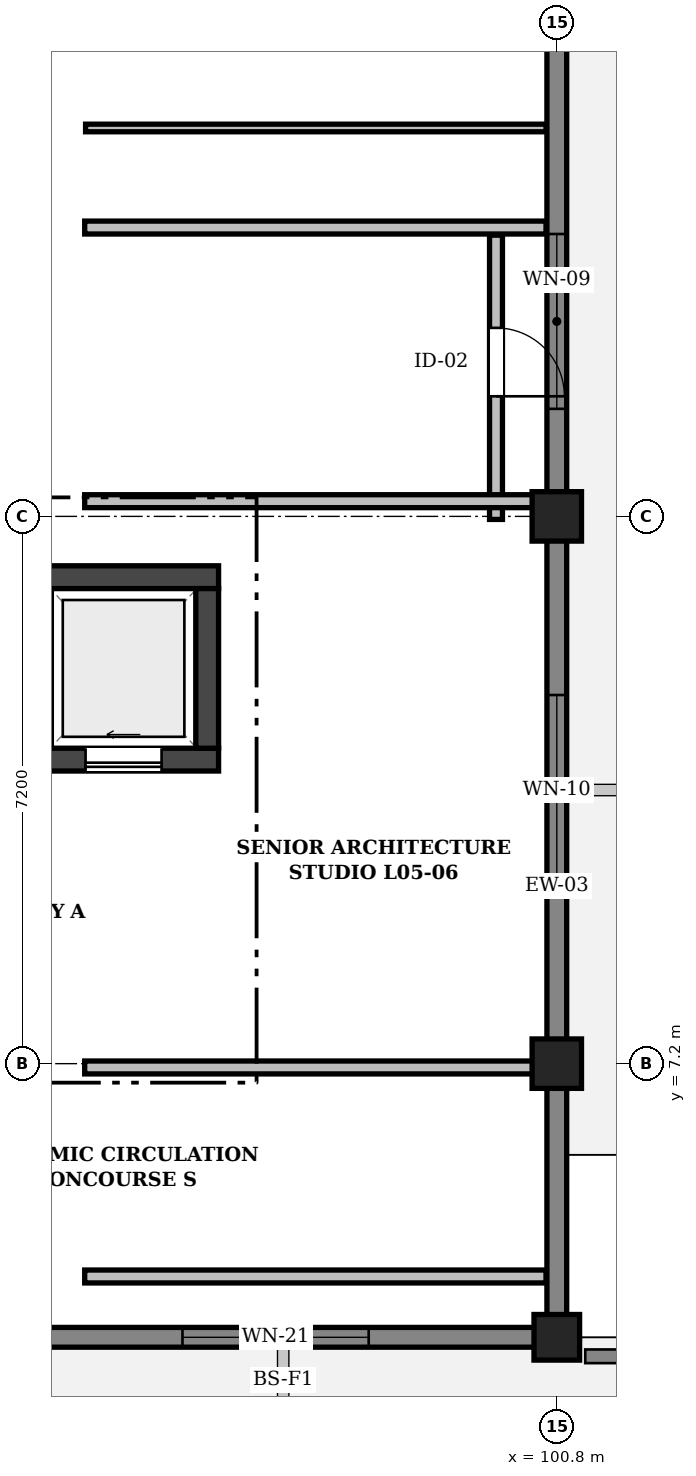
"""IFC4 building model, lengths in metres.
Left out: names, types, materials, properties, quantities, classifications, styles, units other than length and angle.
Written with IfcOpenShell. Run it as: python <this file> out.ifc"""

import sys

from ifc_helpers import new_model, si_unit, direction, frame, frame_2d, origin, origin_2d, place, context, subcontext, project, spatial, rectangle, extrude, element, fill, save


model = new_model("IFC4")
c1 = context("Model", 3, precision=1e-05, world=origin(), true_north=direction((0.0, 1.0)))
c2 = subcontext(c1, "Body", "Model", "MODEL_VIEW")
j1 = project(units=[si_unit("LENGTHUNIT", "METRE"), si_unit("PLANEANGLEUNIT", "RADIAN")], contexts=[c1])
p1 = place(None, origin())
s1 = spatial("IfcSite", under=j1, at=p1, CompositionType="ELEMENT")
p2 = place(p1, origin())
s2 = spatial("IfcBuilding", under=s1, at=p2, CompositionType="ELEMENT")
p3 = place(p2, frame((0.0, 0.0, 23.4)))
s3 = spatial("IfcBuildingStorey", under=s2, at=p3, CompositionType="ELEMENT", Elevation=23.4)
p4 = place(p3, frame((100.8, 3.6, 0.0), z_axis=(0.0, 0.0, 1.0), x_axis=(1.0, 0.0, 0.0)))
e1 = element("IfcColumn", 1, at=p4, inside=s3, PredefinedType="COLUMN", context=c2, shape_type="SweptSolid", body=[
    extrude(rectangle(XDim=0.6, YDim=0.6, at=origin_2d()), origin(), (0.0, 0.0, 1.0), 4.5),
])
for number, where, z_axis, x_axis in (
    (2, (100.8, 7.2, 0.0), (0.0, 0.0, 1.0), (1.0, 0.0, 0.0)),
    (3, (100.8, 14.4, 0.0), (0.0, 0.0, 1.0), (1.0, 0.0, 0.0)),
):
    element("IfcColumn", number, at=place(p3, frame(where, z_axis=z_axis, x_axis=x_axis)), inside=s3, PredefinedType="COLUMN", context=c2, shape_type="SweptSolid", body=[
        extrude(rectangle(XDim=0.65, YDim=0.65, at=origin_2d()), origin(), (0.0, 0.0, 1.0), 4.5),
    ])
p5 = place(p3, frame((100.95, 3.6, 0.0), z_axis=(0.0, 0.0, 1.0), x_axis=(-1.0, 0.0, 0.0)))
e4 = element("IfcWall", 4, at=p5, inside=s3, PredefinedType="SOLIDWALL", context=c2, shape_type="SweptSolid", body=[
    extrude(rectangle(XDim=7.35, YDim=0.26, at=frame_2d((3.675, 0.0))), origin(), (0.0, 0.0, 1.0), 4.22),
])
p6 = place(p5, frame((2.625, 0.0, 0.95)))
e5 = element("IfcOpeningElement", 5, at=p6, cuts=e4, PredefinedType="OPENING", context=c2, shape_type="SweptSolid", body=[
    extrude(rectangle(XDim=2.45, YDim=1.55, at=frame_2d((1.225, 0.775))), frame((0.0, 0.142, 0.0), z_axis=(0.0, -1.0, 0.0), x_axis=(1.0, 0.0, 0.0)), (0.0, 0.0, 1.0), 0.284),
])
p7 = place(p3, frame((100.8, 21.6, 0.0), z_axis=(0.0, 0.0, 1.0), x_axis=(0.0, -1.0, 0.0)))
e6 = element("IfcWall", 6, at=p7, inside=s3, PredefinedType="SOLIDWALL", context=c2, shape_type="SweptSolid", body=[
    extrude(rectangle(XDim=7.2, YDim=0.26, at=frame_2d((3.6, 0.0))), origin(), (0.0, 0.0, 1.0), 4.22),
])
p8 = place(p7, frame((3.485, 0.0, 0.95)))
e7 = element("IfcOpeningElement", 7, at=p8, cuts=e6, PredefinedType="OPENING", context=c2, shape_type="SweptSolid", body=[
    extrude(rectangle(XDim=2.3, YDim=1.3, at=frame_2d((1.15, 0.65))), frame((0.0, 0.142, 0.0), z_axis=(0.0, -1.0, 0.0), x_axis=(1.0, 0.0, 0.0)), (0.0, 0.0, 1.0), 0.284),
])
p9 = place(p3, frame((100.8, 14.4, 0.0), z_axis=(0.0, 0.0, 1.0), x_axis=(0.0, -1.0, 0.0)))
e8 = element("IfcWall", 8, at=p9, inside=s3, PredefinedType="SOLIDWALL", context=c2, shape_type="SweptSolid", body=[
    extrude(rectangle(XDim=7.2, YDim=0.26, at=frame_2d((3.6, 0.0))), origin(), (0.0, 0.0, 1.0), 4.22),
])
p10 = place(p9, frame((2.35, 0.0, 0.95)))
e9 = element("IfcOpeningElement", 9, at=p10, cuts=e8, PredefinedType="OPENING", context=c2, shape_type="SweptSolid", body=[
    extrude(rectangle(XDim=2.5, YDim=1.3, at=frame_2d((1.25, 0.65))), frame((0.0, 0.142, 0.0), z_axis=(0.0, -1.0, 0.0), x_axis=(1.0, 0.0, 0.0)), (0.0, 0.0, 1.0), 0.284),
])
p11 = place(p3, frame((100.8, 7.2, 0.0), z_axis=(0.0, 0.0, 1.0), x_axis=(0.0, -1.0, 0.0)))
e10 = element("IfcWall", 10, at=p11, inside=s3, PredefinedType="SOLIDWALL", context=c2, shape_type="SweptSolid", body=[
    extrude(rectangle(XDim=3.448, YDim=0.26, at=frame_2d((1.724, 0.0))), origin(), (0.0, 0.0, 1.0), 4.22),
])
p12 = place(p3, frame((101.174, 3.35, 0.0), z_axis=(0.0, 0.0, 1.0), x_axis=(1.0, 0.0, 0.0)))
e11 = element("IfcWall", 11, at=p12, inside=s3, PredefinedType="PARAPET", context=c2, shape_type="SweptSolid", body=[
    extrude(rectangle(XDim=10.276, YDim=0.18, at=frame_2d((5.138, 0.0))), origin(), (0.0, 0.0, 1.0), 0.95),
])
p13 = place(p3, frame((93.85, 11.2, 0.0), z_axis=(0.0, 0.0, 1.0), x_axis=(1.0, 0.0, 0.0)))
e12 = element("IfcWall", 12, at=p13, inside=s3, PredefinedType="SHEAR", context=c2, shape_type="SweptSolid", body=[
    extrude(rectangle(XDim=2.5, YDim=0.3, at=frame_2d((1.25, 0.0))), origin(), (0.0, 0.0, 1.0), 4.25),
])
p14 = place(p13, frame((0.75, 0.0, 0.0)))
e13 = element("IfcOpeningElement", 13, at=p14, cuts=e12, PredefinedType="OPENING", context=c2, shape_type="SweptSolid", body=[
    extrude(rectangle(XDim=1.0, YDim=2.1, at=frame_2d((0.5, 1.05))), frame((0.0, 0.162, 0.0), z_axis=(0.0, -1.0, 0.0), x_axis=(1.0, 0.0, 0.0)), (0.0, 0.0, 1.0), 0.324),
])
p15 = place(p3, frame((93.85, 13.6, 0.0), z_axis=(0.0, 0.0, 1.0), x_axis=(1.0, 0.0, 0.0)))
e14 = element("IfcWall", 14, at=p15, inside=s3, PredefinedType="SHEAR", context=c2, shape_type="SweptSolid", body=[
    extrude(rectangle(XDim=2.5, YDim=0.3, at=frame_2d((1.25, 0.0))), origin(), (0.0, 0.0, 1.0), 4.25),
])
p16 = place(p3, frame((96.2, 11.35, 0.0), z_axis=(0.0, 0.0, 1.0), x_axis=(0.0, 1.0, 0.0)))
e15 = element("IfcWall", 15, at=p16, inside=s3, PredefinedType="SHEAR", context=c2, shape_type="SweptSolid", body=[
    extrude(rectangle(XDim=2.1, YDim=0.3, at=frame_2d((1.05, 0.0))), origin(), (0.0, 0.0, 1.0), 4.25),
])
p17 = place(p3, frame((94.588, 18.2, 0.0), z_axis=(0.0, 0.0, 1.0), x_axis=(1.0, 0.0, 0.0)))
e16 = element("IfcWall", 16, at=p17, inside=s3, PredefinedType="PARTITIONING", context=c2, shape_type="SweptSolid", body=[
    extrude(rectangle(XDim=6.07, YDim=0.17, at=frame_2d((3.035, 0.0))), origin(), (0.0, 0.0, 1.0), 4.16),
])
p18 = place(p3, frame((100.0, 14.36, 0.0), z_axis=(0.0, 0.0, 1.0), x_axis=(0.0, 1.0, 0.0)))
e17 = element("IfcWall", 17, at=p18, inside=s3, PredefinedType="PARTITIONING", context=c2, shape_type="SweptSolid", body=[
    extrude(rectangle(XDim=3.74, YDim=0.17, at=frame_2d((1.87, 0.0))), origin(), (0.0, 0.0, 1.0), 4.16),
])
p19 = place(p18, frame((1.62, 0.0, 0.0)))
e18 = element("IfcOpeningElement", 18, at=p19, cuts=e17, PredefinedType="OPENING", context=c2, shape_type="SweptSolid", body=[
    extrude(rectangle(XDim=0.9, YDim=2.08, at=frame_2d((0.45, 1.04))), frame((0.0, 0.097, 0.0), z_axis=(0.0, -1.0, 0.0), x_axis=(1.0, 0.0, 0.0)), (0.0, 0.0, 1.0), 0.194),
])
p20 = place(p3, frame((94.588, 14.6, 0.0), z_axis=(0.0, 0.0, 1.0), x_axis=(1.0, 0.0, 0.0)))
e19 = element("IfcWall", 19, at=p20, inside=s3, PredefinedType="PARTITIONING", context=c2, shape_type="SweptSolid", body=[
    extrude(rectangle(XDim=6.07, YDim=0.17, at=frame_2d((3.035, 0.0))), origin(), (0.0, 0.0, 1.0), 3.73),
])
p21 = place(p3, frame((94.588, 4.4, 0.0), z_axis=(0.0, 0.0, 1.0), x_axis=(1.0, 0.0, 0.0)))
e20 = element("IfcWall", 20, at=p21, inside=s3, PredefinedType="PARTITIONING", context=c2, shape_type="SweptSolid", body=[
    extrude(rectangle(XDim=6.07, YDim=0.17, at=frame_2d((3.035, 0.0))), origin(), (0.0, 0.0, 1.0), 4.16),
])
p22 = place(p3, frame((94.588, 7.15, 0.0), z_axis=(0.0, 0.0, 1.0), x_axis=(1.0, 0.0, 0.0)))
e21 = element("IfcWall", 21, at=p22, inside=s3, PredefinedType="PARTITIONING", context=c2, shape_type="SweptSolid", body=[
    extrude(rectangle(XDim=6.07, YDim=0.17, at=frame_2d((3.035, 0.0))), origin(), (0.0, 0.0, 1.0), 3.73),
])
p23 = place(p3, frame((94.6, 19.51, 0.0), z_axis=(0.0, 0.0, 1.0), x_axis=(1.0, 0.0, 0.0)))
e22 = element("IfcWall", 22, at=p23, inside=s3, PredefinedType="PARTITIONING", context=c2, shape_type="SweptSolid", body=[
    extrude(rectangle(XDim=6.058, YDim=0.1, at=frame_2d((3.029, 0.0))), origin(), (0.0, 0.0, 1.0), 4.16),
])
p24 = place(p6, origin())
e23 = element("IfcWindow", 23, at=p24, inside=s3, PartitioningType="SINGLE_PANEL", PredefinedType="WINDOW", context=c2, shape_type="SweptSolid", body=[
    extrude(rectangle(XDim=2.45, YDim=1.55, at=frame_2d((1.225, 0.775))), frame((0.0, 0.03, 0.0), z_axis=(0.0, -1.0, 0.0), x_axis=(1.0, 0.0, 0.0)), (0.0, 0.0, 1.0), 0.06),
])
fill(e5, e23)
p25 = place(p8, origin())
e24 = element("IfcWindow", 24, at=p25, inside=s3, PartitioningType="SINGLE_PANEL", PredefinedType="WINDOW", context=c2, shape_type="SweptSolid", body=[
    extrude(rectangle(XDim=2.3, YDim=1.3, at=frame_2d((1.15, 0.65))), frame((0.0, 0.03, 0.0), z_axis=(0.0, -1.0, 0.0), x_axis=(1.0, 0.0, 0.0)), (0.0, 0.0, 1.0), 0.06),
])
fill(e7, e24)
p26 = place(p10, origin())
e25 = element("IfcWindow", 25, at=p26, inside=s3, PartitioningType="SINGLE_PANEL", PredefinedType="WINDOW", context=c2, shape_type="SweptSolid", body=[
    extrude(rectangle(XDim=2.5, YDim=1.3, at=frame_2d((1.25, 0.65))), frame((0.0, 0.03, 0.0), z_axis=(0.0, -1.0, 0.0), x_axis=(1.0, 0.0, 0.0)), (0.0, 0.0, 1.0), 0.06),
])
fill(e9, e25)
p27 = place(p14, frame((1.0, 0.0, 0.0), z_axis=(0.0, 0.0, 1.0), x_axis=(-1.0, 0.0, 0.0)))
e26 = element("IfcDoor", 26, at=p27, inside=s3, OperationType="SLIDING_TO_LEFT", PredefinedType="DOOR", context=c2, shape_type="SweptSolid", body=[
    extrude(rectangle(XDim=1.0, YDim=2.1, at=frame_2d((0.5, 1.05))), frame((0.0, 0.025, 0.0), z_axis=(0.0, -1.0, 0.0), x_axis=(1.0, 0.0, 0.0)), (0.0, 0.0, 1.0), 0.05),
])
fill(e13, e26)
p28 = place(p19, frame((0.9, 0.0, 0.0), z_axis=(0.0, 0.0, 1.0), x_axis=(-1.0, 0.0, 0.0)))
e27 = element("IfcDoor", 27, at=p28, inside=s3, OperationType="SINGLE_SWING_RIGHT", PredefinedType="DOOR", context=c2, shape_type="SweptSolid", body=[
    extrude(rectangle(XDim=0.9, YDim=2.08, at=frame_2d((0.45, 1.04))), frame((0.0, 0.025, 0.0), z_axis=(0.0, -1.0, 0.0), x_axis=(1.0, 0.0, 0.0)), (0.0, 0.0, 1.0), 0.05),
])
fill(e18, e27)
save(model, sys.argv[1])
